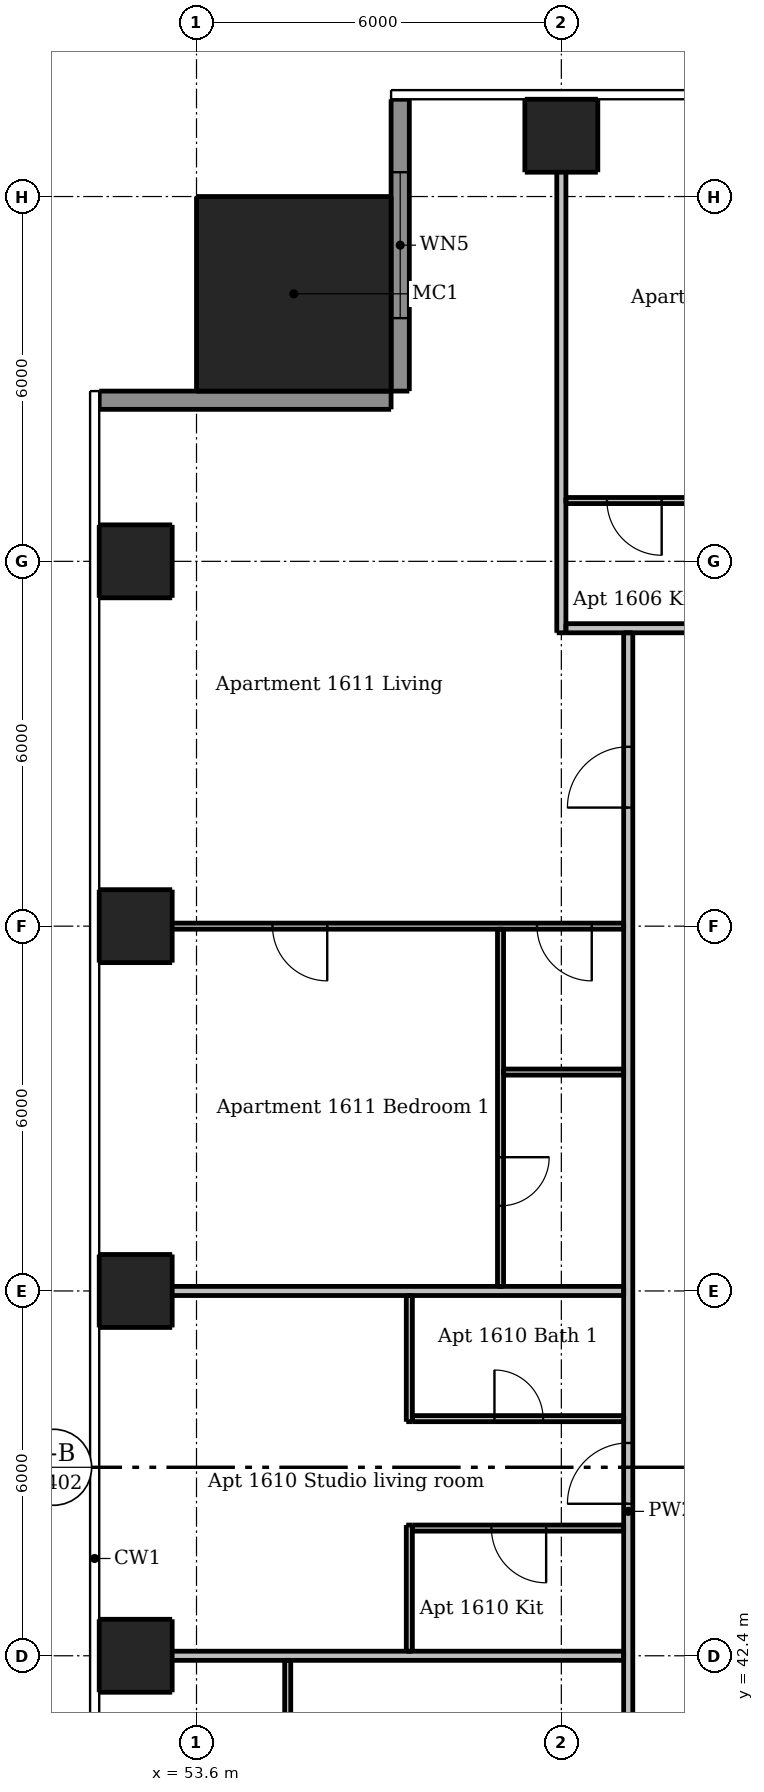
"""IFC4 building model, lengths in metres.
Left out: names, types, materials, properties, quantities, classifications, styles, units other than length and angle.
Written with IfcOpenShell. Run it as: python <this file> out.ifc"""

import sys

from ifc_helpers import new_model, si_unit, direction, frame, frame_2d, origin, origin_2d, place, context, subcontext, project, spatial, rectangle, extrude, element, fill, save


model = new_model("IFC4")
c1 = context("Model", 3, precision=1e-05, world=origin(), true_north=direction((0.0, 1.0)))
c2 = subcontext(c1, "Body", "Model", "MODEL_VIEW")
j1 = project(units=[si_unit("LENGTHUNIT", "METRE"), si_unit("PLANEANGLEUNIT", "RADIAN")], contexts=[c1])
p1 = place(None, origin())
s1 = spatial("IfcSite", under=j1, at=p1, CompositionType="ELEMENT")
p2 = place(p1, origin())
s2 = spatial("IfcBuilding", under=s1, at=p2, CompositionType="ELEMENT")
p3 = place(p2, frame((0.0, 0.0, 59.8)))
s3 = spatial("IfcBuildingStorey", under=s2, at=p3, CompositionType="ELEMENT", Elevation=59.8)
for number, where, z_axis, x_axis in (
    (1, (59.6, 67.4, 0.0), (0.0, 0.0, 1.0), (1.0, 0.0, 0.0)),
    (2, (52.6, 42.4, 0.0), (0.0, 0.0, 1.0), (1.0, 0.0, 0.0)),
    (3, (52.6, 48.4, 0.0), (0.0, 0.0, 1.0), (1.0, 0.0, 0.0)),
    (4, (52.6, 54.4, 0.0), (0.0, 0.0, 1.0), (1.0, 0.0, 0.0)),
    (5, (52.6, 60.4, 0.0), (0.0, 0.0, 1.0), (1.0, 0.0, 0.0)),
):
    element("IfcColumn", number, at=place(p3, frame(where, z_axis=z_axis, x_axis=x_axis)), inside=s3, PredefinedType="COLUMN", context=c2, shape_type="SweptSolid", body=[
        extrude(rectangle(XDim=1.2, YDim=1.2, at=origin_2d()), origin(), (0.0, 0.0, 1.0), 3.05),
    ])
p4 = place(p3, frame((55.2, 64.8, 0.0), z_axis=(0.0, 0.0, 1.0), x_axis=(1.0, 0.0, 0.0)))
e6 = element("IfcColumn", 6, at=p4, inside=s3, PredefinedType="COLUMN", context=c2, shape_type="SweptSolid", body=[
    extrude(rectangle(XDim=3.2, YDim=3.2, at=origin_2d()), origin(), (0.0, 0.0, 1.0), 3.3),
])
p5 = place(p3, frame((56.95, 68.0, 0.0), z_axis=(0.0, 0.0, 1.0), x_axis=(0.0, -1.0, 0.0)))
e7 = element("IfcWall", 7, at=p5, inside=s3, PredefinedType="SOLIDWALL", context=c2, shape_type="SweptSolid", body=[
    extrude(rectangle(XDim=4.8, YDim=0.3, at=frame_2d((2.4, 0.0))), origin(), (0.0, 0.0, 1.0), 3.05),
])
p6 = place(p5, frame((1.2, 0.0, 0.15)))
e8 = element("IfcOpeningElement", 8, at=p6, cuts=e7, PredefinedType="OPENING", context=c2, shape_type="SweptSolid", body=[
    extrude(rectangle(XDim=2.4, YDim=2.1, at=frame_2d((1.2, 1.05))), frame((0.0, 0.16, 0.0), z_axis=(0.0, -1.0, 0.0), x_axis=(1.0, 0.0, 0.0)), (0.0, 0.0, 1.0), 0.32),
])
p7 = place(p3, frame((56.8, 63.05, 0.0), z_axis=(0.0, 0.0, 1.0), x_axis=(-1.0, 0.0, 0.0)))
e9 = element("IfcWall", 9, at=p7, inside=s3, PredefinedType="SOLIDWALL", context=c2, shape_type="SweptSolid", body=[
    extrude(rectangle(XDim=4.8, YDim=0.3, at=frame_2d((2.4, 0.0))), origin(), (0.0, 0.0, 1.0), 3.05),
])
p8 = place(p3, frame((55.1, 39.95, 0.0), z_axis=(0.0, 0.0, 1.0), x_axis=(0.0, 1.0, 0.0)))
e10 = element("IfcWall", 10, at=p8, inside=s3, PredefinedType="PARTITIONING", context=c2, shape_type="SweptSolid", body=[
    extrude(rectangle(XDim=2.375, YDim=0.1, at=frame_2d((1.188, 0.0))), origin(), (0.0, 0.0, 1.0), 3.05),
])
for number, where, z_axis, x_axis in (
    (11, (57.1, 42.475, 0.0), (0.0, 0.0, 1.0), (0.0, 1.0, 0.0)),
    (12, (57.1, 46.25, 0.0), (0.0, 0.0, 1.0), (0.0, 1.0, 0.0)),
):
    element("IfcWall", number, at=place(p3, frame(where, z_axis=z_axis, x_axis=x_axis)), inside=s3, PredefinedType="PARTITIONING", context=c2, shape_type="SweptSolid", body=[
        extrude(rectangle(XDim=2.075, YDim=0.1, at=frame_2d((1.038, 0.0))), origin(), (0.0, 0.0, 1.0), 3.05),
    ])
p9 = place(p3, frame((58.6, 54.35, 0.0), z_axis=(0.0, 0.0, 1.0), x_axis=(0.0, -1.0, 0.0)))
e13 = element("IfcWall", 13, at=p9, inside=s3, PredefinedType="PARTITIONING", context=c2, shape_type="SweptSolid", body=[
    extrude(rectangle(XDim=5.875, YDim=0.1, at=frame_2d((2.938, 0.0))), origin(), (0.0, 0.0, 1.0), 3.05),
])
p10 = place(p9, frame((3.75, 0.0, 0.0)))
e14 = element("IfcOpeningElement", 14, at=p10, cuts=e13, PredefinedType="OPENING", context=c2, shape_type="SweptSolid", body=[
    extrude(rectangle(XDim=0.8, YDim=2.1, at=frame_2d((0.4, 1.05))), frame((0.0, 0.06, 0.0), z_axis=(0.0, -1.0, 0.0), x_axis=(1.0, 0.0, 0.0)), (0.0, 0.0, 1.0), 0.12),
])
p11 = place(p3, frame((61.95, 61.4, 0.0), z_axis=(0.0, 0.0, 1.0), x_axis=(-1.0, 0.0, 0.0)))
e15 = element("IfcWall", 15, at=p11, inside=s3, PredefinedType="PARTITIONING", context=c2, shape_type="SweptSolid", body=[
    extrude(rectangle(XDim=2.275, YDim=0.1, at=frame_2d((1.137, 0.0))), origin(), (0.0, 0.0, 1.0), 3.05),
])
p12 = place(p11, frame((0.7, 0.0, 0.0)))
e16 = element("IfcOpeningElement", 16, at=p12, cuts=e15, PredefinedType="OPENING", context=c2, shape_type="SweptSolid", body=[
    extrude(rectangle(XDim=0.9, YDim=2.1, at=frame_2d((0.45, 1.05))), frame((0.0, 0.06, 0.0), z_axis=(0.0, -1.0, 0.0), x_axis=(1.0, 0.0, 0.0)), (0.0, 0.0, 1.0), 0.12),
])
p13 = place(p3, frame((60.625, 54.4, 0.0), z_axis=(0.0, 0.0, 1.0), x_axis=(-1.0, 0.0, 0.0)))
e17 = element("IfcWall", 17, at=p13, inside=s3, PredefinedType="PARTITIONING", context=c2, shape_type="SweptSolid", body=[
    extrude(rectangle(XDim=8.625, YDim=0.1, at=frame_2d((4.312, 0.0))), origin(), (0.0, 0.0, 1.0), 2.516),
])
p14 = place(p13, frame((0.525, 0.0, 0.0)))
e18 = element("IfcOpeningElement", 18, at=p14, cuts=e17, PredefinedType="OPENING", context=c2, shape_type="SweptSolid", body=[
    extrude(rectangle(XDim=0.9, YDim=2.1, at=frame_2d((0.45, 1.05))), frame((0.0, 0.06, 0.0), z_axis=(0.0, -1.0, 0.0), x_axis=(1.0, 0.0, 0.0)), (0.0, 0.0, 1.0), 0.12),
])
p15 = place(p13, frame((4.875, 0.0, 0.0)))
e19 = element("IfcOpeningElement", 19, at=p15, cuts=e17, PredefinedType="OPENING", context=c2, shape_type="SweptSolid", body=[
    extrude(rectangle(XDim=0.9, YDim=2.1, at=frame_2d((0.45, 1.05))), frame((0.0, 0.06, 0.0), z_axis=(0.0, -1.0, 0.0), x_axis=(1.0, 0.0, 0.0)), (0.0, 0.0, 1.0), 0.12),
])
p16 = place(p3, frame((58.65, 52.0, 0.0), z_axis=(0.0, 0.0, 1.0), x_axis=(1.0, 0.0, 0.0)))
e20 = element("IfcWall", 20, at=p16, inside=s3, PredefinedType="PARTITIONING", context=c2, shape_type="SweptSolid", body=[
    extrude(rectangle(XDim=1.975, YDim=0.1, at=frame_2d((0.988, 0.0))), origin(), (0.0, 0.0, 1.0), 3.05),
])
p17 = place(p3, frame((57.15, 46.3, 0.0), z_axis=(0.0, 0.0, 1.0), x_axis=(1.0, 0.0, 0.0)))
e21 = element("IfcWall", 21, at=p17, inside=s3, PredefinedType="PARTITIONING", context=c2, shape_type="SweptSolid", body=[
    extrude(rectangle(XDim=3.475, YDim=0.1, at=frame_2d((1.738, 0.0))), origin(), (0.0, 0.0, 1.0), 3.05),
])
p18 = place(p17, frame((1.35, 0.0, 0.0)))
e22 = element("IfcOpeningElement", 22, at=p18, cuts=e21, PredefinedType="OPENING", context=c2, shape_type="SweptSolid", body=[
    extrude(rectangle(XDim=0.8, YDim=2.1, at=frame_2d((0.4, 1.05))), frame((0.0, 0.06, 0.0), z_axis=(0.0, -1.0, 0.0), x_axis=(1.0, 0.0, 0.0)), (0.0, 0.0, 1.0), 0.12),
])
p19 = place(p3, frame((60.625, 44.5, 0.0), z_axis=(0.0, 0.0, 1.0), x_axis=(-1.0, 0.0, 0.0)))
e23 = element("IfcWall", 23, at=p19, inside=s3, PredefinedType="PARTITIONING", context=c2, shape_type="SweptSolid", body=[
    extrude(rectangle(XDim=3.475, YDim=0.1, at=frame_2d((1.738, 0.0))), origin(), (0.0, 0.0, 1.0), 3.05),
])
p20 = place(p19, frame((1.275, 0.0, 0.0)))
e24 = element("IfcOpeningElement", 24, at=p20, cuts=e23, PredefinedType="OPENING", context=c2, shape_type="SweptSolid", body=[
    extrude(rectangle(XDim=0.9, YDim=2.1, at=frame_2d((0.45, 1.05))), frame((0.0, 0.06, 0.0), z_axis=(0.0, -1.0, 0.0), x_axis=(1.0, 0.0, 0.0)), (0.0, 0.0, 1.0), 0.12),
])
p21 = place(p3, frame((59.6, 59.225, 0.0), z_axis=(0.0, 0.0, 1.0), x_axis=(0.0, 1.0, 0.0)))
e25 = element("IfcWall", 25, at=p21, inside=s3, PredefinedType="PARTITIONING", context=c2, shape_type="SweptSolid", body=[
    extrude(rectangle(XDim=8.775, YDim=0.15, at=frame_2d((4.387, 0.0))), origin(), (0.0, 0.0, 1.0), 2.51),
])
p22 = place(p3, frame((60.7, 30.325, 0.0), z_axis=(0.0, 0.0, 1.0), x_axis=(0.0, 1.0, 0.0)))
e26 = element("IfcWall", 26, at=p22, inside=s3, PredefinedType="PARTITIONING", context=c2, shape_type="SweptSolid", body=[
    extrude(rectangle(XDim=28.9, YDim=0.15, at=frame_2d((14.45, 0.0))), origin(), (0.0, 0.0, 1.0), 3.05),
])
p23 = place(p22, frame((7.375, 0.0, 0.0)))
e27 = element("IfcOpeningElement", 27, at=p23, cuts=e26, PredefinedType="OPENING", context=c2, shape_type="SweptSolid", body=[
    extrude(rectangle(XDim=1.0, YDim=2.1, at=frame_2d((0.5, 1.05))), frame((0.0, 0.085, 0.0), z_axis=(0.0, -1.0, 0.0), x_axis=(1.0, 0.0, 0.0)), (0.0, 0.0, 1.0), 0.17),
])
p24 = place(p22, frame((14.575, 0.0, 0.0)))
e28 = element("IfcOpeningElement", 28, at=p24, cuts=e26, PredefinedType="OPENING", context=c2, shape_type="SweptSolid", body=[
    extrude(rectangle(XDim=1.0, YDim=2.1, at=frame_2d((0.5, 1.05))), frame((0.0, 0.085, 0.0), z_axis=(0.0, -1.0, 0.0), x_axis=(1.0, 0.0, 0.0)), (0.0, 0.0, 1.0), 0.17),
])
p25 = place(p22, frame((26.025, 0.0, 0.0)))
e29 = element("IfcOpeningElement", 29, at=p25, cuts=e26, PredefinedType="OPENING", context=c2, shape_type="SweptSolid", body=[
    extrude(rectangle(XDim=1.0, YDim=2.1, at=frame_2d((0.5, 1.05))), frame((0.0, 0.085, 0.0), z_axis=(0.0, -1.0, 0.0), x_axis=(1.0, 0.0, 0.0)), (0.0, 0.0, 1.0), 0.17),
])
p26 = place(p3, frame((59.675, 59.3, 0.0), z_axis=(0.0, 0.0, 1.0), x_axis=(1.0, 0.0, 0.0)))
e30 = element("IfcWall", 30, at=p26, inside=s3, PredefinedType="PARTITIONING", context=c2, shape_type="SweptSolid", body=[
    extrude(rectangle(XDim=28.55, YDim=0.15, at=frame_2d((14.275, 0.0))), origin(), (0.0, 0.0, 1.0), 3.05),
])
p27 = place(p26, frame((3.625, 0.0, 0.0)))
e31 = element("IfcOpeningElement", 31, at=p27, cuts=e30, PredefinedType="OPENING", context=c2, shape_type="SweptSolid", body=[
    extrude(rectangle(XDim=1.0, YDim=2.1, at=frame_2d((0.5, 1.05))), frame((0.0, 0.085, 0.0), z_axis=(0.0, -1.0, 0.0), x_axis=(1.0, 0.0, 0.0)), (0.0, 0.0, 1.0), 0.17),
])
p28 = place(p26, frame((14.425, 0.0, 0.0)))
e32 = element("IfcOpeningElement", 32, at=p28, cuts=e30, PredefinedType="OPENING", context=c2, shape_type="SweptSolid", body=[
    extrude(rectangle(XDim=1.0, YDim=2.1, at=frame_2d((0.5, 1.05))), frame((0.0, 0.085, 0.0), z_axis=(0.0, -1.0, 0.0), x_axis=(1.0, 0.0, 0.0)), (0.0, 0.0, 1.0), 0.17),
])
p29 = place(p26, frame((25.775, 0.0, 0.0)))
e33 = element("IfcOpeningElement", 33, at=p29, cuts=e30, PredefinedType="OPENING", context=c2, shape_type="SweptSolid", body=[
    extrude(rectangle(XDim=1.0, YDim=2.1, at=frame_2d((0.5, 1.05))), frame((0.0, 0.085, 0.0), z_axis=(0.0, -1.0, 0.0), x_axis=(1.0, 0.0, 0.0)), (0.0, 0.0, 1.0), 0.17),
])
for number, where, z_axis, x_axis in (
    (34, (52.0, 48.4, 0.0), (0.0, 0.0, 1.0), (1.0, 0.0, 0.0)),
    (35, (52.0, 42.4, 0.0), (0.0, 0.0, 1.0), (1.0, 0.0, 0.0)),
):
    element("IfcWall", number, at=place(p3, frame(where, z_axis=z_axis, x_axis=x_axis)), inside=s3, PredefinedType="PARTITIONING", context=c2, shape_type="SweptSolid", body=[
        extrude(rectangle(XDim=8.625, YDim=0.15, at=frame_2d((4.312, 0.0))), origin(), (0.0, 0.0, 1.0), 2.516),
    ])
p30 = place(p6, origin())
e36 = element("IfcWindow", 36, at=p30, inside=s3, PartitioningType="DOUBLE_PANEL_VERTICAL", PredefinedType="WINDOW", context=c2, shape_type="SweptSolid", body=[
    extrude(rectangle(XDim=2.4, YDim=2.1, at=frame_2d((1.2, 1.05))), frame((0.0, 0.03, 0.0), z_axis=(0.0, -1.0, 0.0), x_axis=(1.0, 0.0, 0.0)), (0.0, 0.0, 1.0), 0.06),
])
fill(e8, e36)
p31 = place(p12, origin())
e37 = element("IfcDoor", 37, at=p31, inside=s3, OperationType="SINGLE_SWING_LEFT", PredefinedType="DOOR", context=c2, shape_type="SweptSolid", body=[
    extrude(rectangle(XDim=0.9, YDim=2.1, at=frame_2d((0.45, 1.05))), frame((0.0, 0.025, 0.0), z_axis=(0.0, -1.0, 0.0), x_axis=(1.0, 0.0, 0.0)), (0.0, 0.0, 1.0), 0.05),
])
fill(e16, e37)
p32 = place(p24, origin())
e38 = element("IfcDoor", 38, at=p32, inside=s3, OperationType="SINGLE_SWING_LEFT", PredefinedType="DOOR", context=c2, shape_type="SweptSolid", body=[
    extrude(rectangle(XDim=1.0, YDim=2.1, at=frame_2d((0.5, 1.05))), frame((0.0, 0.025, 0.0), z_axis=(0.0, -1.0, 0.0), x_axis=(1.0, 0.0, 0.0)), (0.0, 0.0, 1.0), 0.05),
])
fill(e28, e38)
p33 = place(p20, origin())
e39 = element("IfcDoor", 39, at=p33, inside=s3, OperationType="SINGLE_SWING_LEFT", PredefinedType="DOOR", context=c2, shape_type="SweptSolid", body=[
    extrude(rectangle(XDim=0.9, YDim=2.1, at=frame_2d((0.45, 1.05))), frame((0.0, 0.025, 0.0), z_axis=(0.0, -1.0, 0.0), x_axis=(1.0, 0.0, 0.0)), (0.0, 0.0, 1.0), 0.05),
])
fill(e24, e39)
p34 = place(p18, origin())
e40 = element("IfcDoor", 40, at=p34, inside=s3, OperationType="SINGLE_SWING_LEFT", PredefinedType="DOOR", context=c2, shape_type="SweptSolid", body=[
    extrude(rectangle(XDim=0.8, YDim=2.1, at=frame_2d((0.4, 1.05))), frame((0.0, 0.025, 0.0), z_axis=(0.0, -1.0, 0.0), x_axis=(1.0, 0.0, 0.0)), (0.0, 0.0, 1.0), 0.05),
])
fill(e22, e40)
p35 = place(p25, origin())
e41 = element("IfcDoor", 41, at=p35, inside=s3, OperationType="SINGLE_SWING_LEFT", PredefinedType="DOOR", context=c2, shape_type="SweptSolid", body=[
    extrude(rectangle(XDim=1.0, YDim=2.1, at=frame_2d((0.5, 1.05))), frame((0.0, 0.025, 0.0), z_axis=(0.0, -1.0, 0.0), x_axis=(1.0, 0.0, 0.0)), (0.0, 0.0, 1.0), 0.05),
])
fill(e29, e41)
p36 = place(p14, origin())
e42 = element("IfcDoor", 42, at=p36, inside=s3, OperationType="SINGLE_SWING_LEFT", PredefinedType="DOOR", context=c2, shape_type="SweptSolid", body=[
    extrude(rectangle(XDim=0.9, YDim=2.1, at=frame_2d((0.45, 1.05))), frame((0.0, 0.025, 0.0), z_axis=(0.0, -1.0, 0.0), x_axis=(1.0, 0.0, 0.0)), (0.0, 0.0, 1.0), 0.05),
])
fill(e18, e42)
p37 = place(p15, origin())
e43 = element("IfcDoor", 43, at=p37, inside=s3, OperationType="SINGLE_SWING_LEFT", PredefinedType="DOOR", context=c2, shape_type="SweptSolid", body=[
    extrude(rectangle(XDim=0.9, YDim=2.1, at=frame_2d((0.45, 1.05))), frame((0.0, 0.025, 0.0), z_axis=(0.0, -1.0, 0.0), x_axis=(1.0, 0.0, 0.0)), (0.0, 0.0, 1.0), 0.05),
])
fill(e19, e43)
p38 = place(p10, origin())
e44 = element("IfcDoor", 44, at=p38, inside=s3, OperationType="SINGLE_SWING_LEFT", PredefinedType="DOOR", context=c2, shape_type="SweptSolid", body=[
    extrude(rectangle(XDim=0.8, YDim=2.1, at=frame_2d((0.4, 1.05))), frame((0.0, 0.025, 0.0), z_axis=(0.0, -1.0, 0.0), x_axis=(1.0, 0.0, 0.0)), (0.0, 0.0, 1.0), 0.05),
])
fill(e14, e44)
save(model, sys.argv[1])
